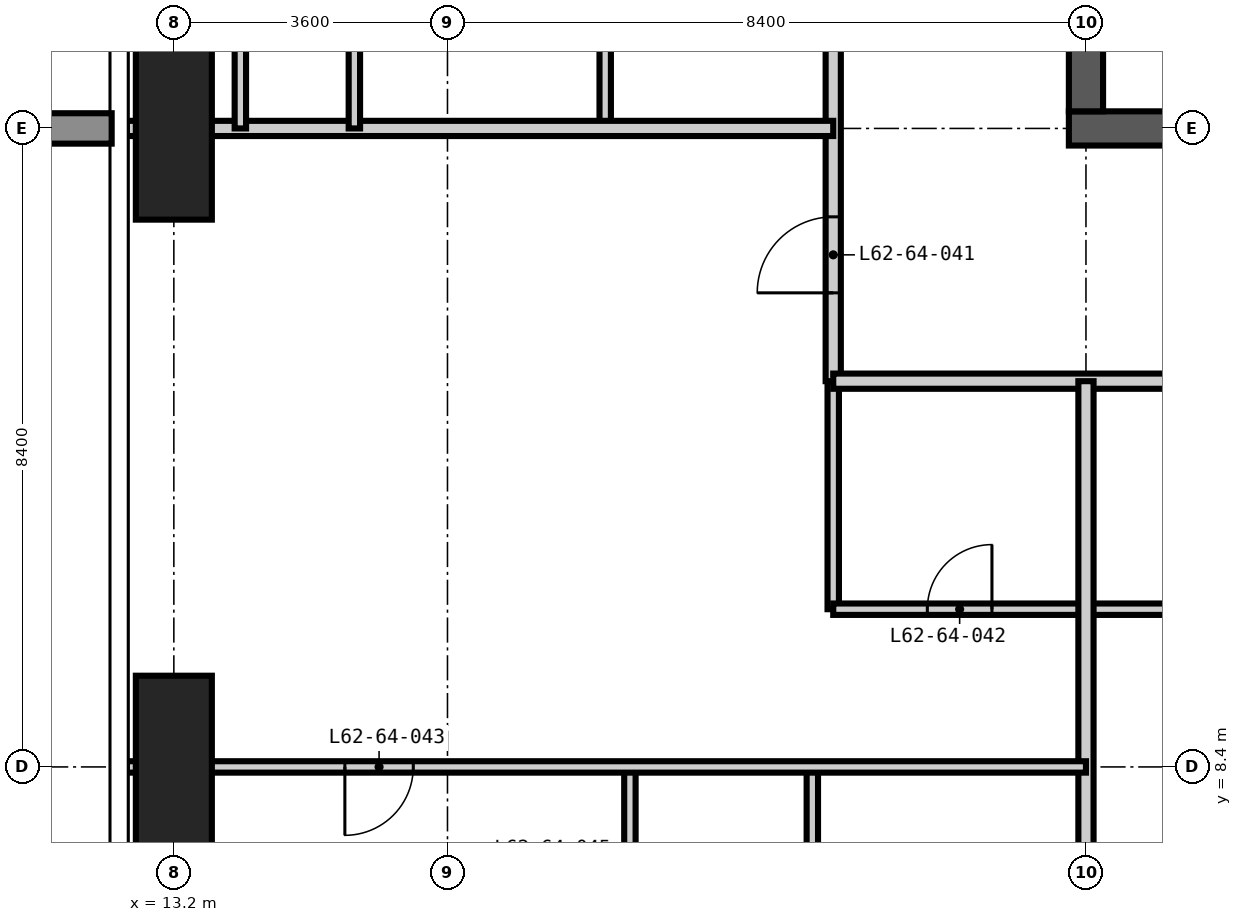
"""IFC4 building model, lengths in metres.
Left out: names, types, materials, properties, quantities, classifications, styles, units other than length and angle.
Written with IfcOpenShell. Run it as: python <this file> out.ifc"""

import sys

from ifc_helpers import new_model, si_unit, direction, frame, frame_2d, origin, origin_2d, place, context, subcontext, project, spatial, rectangle, extrude, element, fill, save


model = new_model("IFC4")
c1 = context("Model", 3, precision=1e-05, world=origin(), true_north=direction((0.0, 1.0)))
c2 = subcontext(c1, "Body", "Model", "MODEL_VIEW")
j1 = project(units=[si_unit("LENGTHUNIT", "METRE"), si_unit("PLANEANGLEUNIT", "RADIAN")], contexts=[c1])
p1 = place(None, origin())
s1 = spatial("IfcSite", under=j1, at=p1, CompositionType="ELEMENT")
p2 = place(p1, origin())
s2 = spatial("IfcBuilding", under=s1, at=p2, CompositionType="ELEMENT")
p3 = place(p2, frame((0.0, 0.0, 241.2)))
s3 = spatial("IfcBuildingStorey", under=s2, at=p3, CompositionType="ELEMENT", Elevation=241.2)
for number, where, z_axis, x_axis in (
    (1, (13.2, 8.4, -0.35), (0.0, 0.0, 1.0), (1.0, 0.0, 0.0)),
    (2, (13.2, 16.8, -0.35), (0.0, 0.0, 1.0), (1.0, 0.0, 0.0)),
):
    element("IfcColumn", number, at=place(p3, frame(where, z_axis=z_axis, x_axis=x_axis)), inside=s3, PredefinedType="COLUMN", context=c2, shape_type="SweptSolid", body=[
        extrude(rectangle(XDim=1.0, YDim=2.4, at=origin_2d()), origin(), (0.0, 0.0, 1.0), 3.9),
    ])
p4 = place(p3, frame((24.975, 16.8, -0.35), z_axis=(0.0, 0.0, 1.0), x_axis=(1.0, 0.0, 0.0)))
e3 = element("IfcWall", 3, at=p4, inside=s3, PredefinedType="SHEAR", context=c2, shape_type="SweptSolid", body=[
    extrude(rectangle(XDim=17.25, YDim=0.45, at=frame_2d((8.625, 0.0))), origin(), (0.0, 0.0, 1.0), 3.9),
])
p5 = place(p4, frame((3.925, 0.0, 0.35)))
e4 = element("IfcOpeningElement", 4, at=p5, cuts=e3, PredefinedType="OPENING", context=c2, shape_type="SweptSolid", body=[
    extrude(rectangle(XDim=1.0, YDim=2.1, at=frame_2d((0.5, 1.05))), frame((0.0, 0.235, 0.0), z_axis=(0.0, -1.0, 0.0), x_axis=(1.0, 0.0, 0.0)), (0.0, 0.0, 1.0), 0.47),
])
p6 = place(p4, frame((10.225, 0.0, 0.35)))
e5 = element("IfcOpeningElement", 5, at=p6, cuts=e3, PredefinedType="OPENING", context=c2, shape_type="SweptSolid", body=[
    extrude(rectangle(XDim=1.0, YDim=2.1, at=frame_2d((0.5, 1.05))), frame((0.0, 0.235, 0.0), z_axis=(0.0, -1.0, 0.0), x_axis=(1.0, 0.0, 0.0)), (0.0, 0.0, 1.0), 0.47),
])
p7 = place(p3, frame((25.2, 41.775, -0.35), z_axis=(0.0, 0.0, 1.0), x_axis=(0.0, -1.0, 0.0)))
e6 = element("IfcWall", 6, at=p7, inside=s3, PredefinedType="SHEAR", context=c2, shape_type="SweptSolid", body=[
    extrude(rectangle(XDim=24.75, YDim=0.45, at=frame_2d((12.375, 0.0))), origin(), (0.0, 0.0, 1.0), 3.9),
])
p8 = place(p7, frame((11.875, 0.0, 0.35)))
e7 = element("IfcOpeningElement", 7, at=p8, cuts=e6, PredefinedType="OPENING", context=c2, shape_type="SweptSolid", body=[
    extrude(rectangle(XDim=1.0, YDim=2.1, at=frame_2d((0.5, 1.05))), frame((0.0, 0.235, 0.0), z_axis=(0.0, -1.0, 0.0), x_axis=(1.0, 0.0, 0.0)), (0.0, 0.0, 1.0), 0.47),
])
for number, where, z_axis, x_axis in (
    (8, (18.875, 16.8, 0.0), (0.0, 0.0, 1.0), (0.0, 1.0, 0.0)),
    (9, (21.875, 10.475, 0.0), (0.0, 0.0, 1.0), (0.0, 1.0, 0.0)),
):
    element("IfcWall", number, at=place(p3, frame(where, z_axis=z_axis, x_axis=x_axis)), inside=s3, PredefinedType="PARTITIONING", context=c2, shape_type="SweptSolid", body=[
        extrude(rectangle(XDim=3.0, YDim=0.15, at=frame_2d((1.5, 0.0))), origin(), (0.0, 0.0, 1.0), 3.55),
    ])
p9 = place(p3, frame((21.875, 10.475, 0.0), z_axis=(0.0, 0.0, 1.0), x_axis=(1.0, 0.0, 0.0)))
e10 = element("IfcWall", 10, at=p9, inside=s3, PredefinedType="PARTITIONING", context=c2, shape_type="SweptSolid", body=[
    extrude(rectangle(XDim=6.325, YDim=0.15, at=frame_2d((3.163, 0.0))), origin(), (0.0, 0.0, 1.0), 3.55),
])
p10 = place(p9, frame((1.238, 0.0, 0.0)))
e11 = element("IfcOpeningElement", 11, at=p10, cuts=e10, PredefinedType="OPENING", context=c2, shape_type="SweptSolid", body=[
    extrude(rectangle(XDim=0.85, YDim=2.1, at=frame_2d((0.425, 1.05))), frame((0.0, 0.085, 0.0), z_axis=(0.0, -1.0, 0.0), x_axis=(1.0, 0.0, 0.0)), (0.0, 0.0, 1.0), 0.17),
])
p11 = place(p3, frame((21.875, 13.475, 0.0), z_axis=(0.0, 0.0, 1.0), x_axis=(0.0, 1.0, 0.0)))
e12 = element("IfcWall", 12, at=p11, inside=s3, PredefinedType="PARTITIONING", context=c2, shape_type="SweptSolid", body=[
    extrude(rectangle(XDim=31.25, YDim=0.2, at=frame_2d((15.625, 0.0))), origin(), (0.0, 0.0, 1.0), 3.55),
])
p12 = place(p11, frame((7.025, 0.0, 0.0)))
e13 = element("IfcOpeningElement", 13, at=p12, cuts=e12, PredefinedType="OPENING", context=c2, shape_type="SweptSolid", body=[
    extrude(rectangle(XDim=1.0, YDim=2.2, at=frame_2d((0.5, 1.1))), frame((0.0, 0.11, 0.0), z_axis=(0.0, -1.0, 0.0), x_axis=(1.0, 0.0, 0.0)), (0.0, 0.0, 1.0), 0.22),
])
p13 = place(p11, frame((15.425, 0.0, 0.0)))
e14 = element("IfcOpeningElement", 14, at=p13, cuts=e12, PredefinedType="OPENING", context=c2, shape_type="SweptSolid", body=[
    extrude(rectangle(XDim=1.0, YDim=2.2, at=frame_2d((0.5, 1.1))), frame((0.0, 0.11, 0.0), z_axis=(0.0, -1.0, 0.0), x_axis=(1.0, 0.0, 0.0)), (0.0, 0.0, 1.0), 0.22),
])
p14 = place(p11, frame((23.825, 0.0, 0.0)))
e15 = element("IfcOpeningElement", 15, at=p14, cuts=e12, PredefinedType="OPENING", context=c2, shape_type="SweptSolid", body=[
    extrude(rectangle(XDim=1.0, YDim=2.2, at=frame_2d((0.5, 1.1))), frame((0.0, 0.11, 0.0), z_axis=(0.0, -1.0, 0.0), x_axis=(1.0, 0.0, 0.0)), (0.0, 0.0, 1.0), 0.22),
])
p15 = place(p11, frame((1.162, 0.0, 0.0)))
e16 = element("IfcOpeningElement", 16, at=p15, cuts=e12, PredefinedType="OPENING", context=c2, shape_type="SweptSolid", body=[
    extrude(rectangle(XDim=1.0, YDim=2.2, at=frame_2d((0.5, 1.1))), frame((0.0, 0.11, 0.0), z_axis=(0.0, -1.0, 0.0), x_axis=(1.0, 0.0, 0.0)), (0.0, 0.0, 1.0), 0.22),
])
p16 = place(p11, frame((29.387, 0.0, 0.0)))
e17 = element("IfcOpeningElement", 17, at=p16, cuts=e12, PredefinedType="OPENING", context=c2, shape_type="SweptSolid", body=[
    extrude(rectangle(XDim=1.0, YDim=2.2, at=frame_2d((0.5, 1.1))), frame((0.0, 0.11, 0.0), z_axis=(0.0, -1.0, 0.0), x_axis=(1.0, 0.0, 0.0)), (0.0, 0.0, 1.0), 0.22),
])
p17 = place(p3, frame((44.125, 13.475, 0.0), z_axis=(0.0, 0.0, 1.0), x_axis=(-1.0, 0.0, 0.0)))
e18 = element("IfcWall", 18, at=p17, inside=s3, PredefinedType="PARTITIONING", context=c2, shape_type="SweptSolid", body=[
    extrude(rectangle(XDim=22.25, YDim=0.2, at=frame_2d((11.125, 0.0))), origin(), (0.0, 0.0, 1.0), 3.55),
])
p18 = place(p17, frame((16.325, 0.0, 0.0)))
e19 = element("IfcOpeningElement", 19, at=p18, cuts=e18, PredefinedType="OPENING", context=c2, shape_type="SweptSolid", body=[
    extrude(rectangle(XDim=1.0, YDim=2.2, at=frame_2d((0.5, 1.1))), frame((0.0, 0.11, 0.0), z_axis=(0.0, -1.0, 0.0), x_axis=(1.0, 0.0, 0.0)), (0.0, 0.0, 1.0), 0.22),
])
p19 = place(p17, frame((10.025, 0.0, 0.0)))
e20 = element("IfcOpeningElement", 20, at=p19, cuts=e18, PredefinedType="OPENING", context=c2, shape_type="SweptSolid", body=[
    extrude(rectangle(XDim=1.0, YDim=2.2, at=frame_2d((0.5, 1.1))), frame((0.0, 0.11, 0.0), z_axis=(0.0, -1.0, 0.0), x_axis=(1.0, 0.0, 0.0)), (0.0, 0.0, 1.0), 0.22),
])
p20 = place(p17, frame((3.725, 0.0, 0.0)))
e21 = element("IfcOpeningElement", 21, at=p20, cuts=e18, PredefinedType="OPENING", context=c2, shape_type="SweptSolid", body=[
    extrude(rectangle(XDim=1.0, YDim=2.2, at=frame_2d((0.5, 1.1))), frame((0.0, 0.11, 0.0), z_axis=(0.0, -1.0, 0.0), x_axis=(1.0, 0.0, 0.0)), (0.0, 0.0, 1.0), 0.22),
])
p21 = place(p3, frame((25.2, 4.182, 0.0), z_axis=(0.0, 0.0, 1.0), x_axis=(0.0, 1.0, 0.0)))
e22 = element("IfcWall", 22, at=p21, inside=s3, PredefinedType="PARTITIONING", context=c2, shape_type="SweptSolid", body=[
    extrude(rectangle(XDim=9.293, YDim=0.2, at=frame_2d((4.646, 0.0))), origin(), (0.0, 0.0, 1.0), 3.55),
])
p22 = place(p3, frame((12.582, 16.8, 0.0), z_axis=(0.0, 0.0, 1.0), x_axis=(1.0, 0.0, 0.0)))
e23 = element("IfcWall", 23, at=p22, inside=s3, PredefinedType="PARTITIONING", context=c2, shape_type="SweptSolid", body=[
    extrude(rectangle(XDim=9.293, YDim=0.2, at=frame_2d((4.646, 0.0))), origin(), (0.0, 0.0, 1.0), 3.55),
])
p23 = place(p3, frame((14.075, 16.8, 0.0), z_axis=(0.0, 0.0, 1.0), x_axis=(0.0, 1.0, 0.0)))
e24 = element("IfcWall", 24, at=p23, inside=s3, PredefinedType="PARTITIONING", context=c2, shape_type="SweptSolid", body=[
    extrude(rectangle(XDim=3.0, YDim=0.15, at=frame_2d((1.5, 0.0))), origin(), (0.0, 0.0, 1.0), 3.55),
])
p24 = place(p23, frame((1.25, 0.0, 0.0)))
e25 = element("IfcOpeningElement", 25, at=p24, cuts=e24, PredefinedType="OPENING", context=c2, shape_type="SweptSolid", body=[
    extrude(rectangle(XDim=0.9, YDim=2.1, at=frame_2d((0.45, 1.05))), frame((0.0, 0.085, 0.0), z_axis=(0.0, -1.0, 0.0), x_axis=(1.0, 0.0, 0.0)), (0.0, 0.0, 1.0), 0.17),
])
p25 = place(p3, frame((15.575, 16.8, 0.0), z_axis=(0.0, 0.0, 1.0), x_axis=(0.0, 1.0, 0.0)))
e26 = element("IfcWall", 26, at=p25, inside=s3, PredefinedType="PARTITIONING", context=c2, shape_type="SweptSolid", body=[
    extrude(rectangle(XDim=3.0, YDim=0.15, at=frame_2d((1.5, 0.0))), origin(), (0.0, 0.0, 1.0), 3.55),
])
p26 = place(p3, frame((19.2, 5.4, 0.0), z_axis=(0.0, 0.0, 1.0), x_axis=(0.0, 1.0, 0.0)))
e27 = element("IfcWall", 27, at=p26, inside=s3, PredefinedType="PARTITIONING", context=c2, shape_type="SweptSolid", body=[
    extrude(rectangle(XDim=3.0, YDim=0.15, at=frame_2d((1.5, 0.0))), origin(), (0.0, 0.0, 1.0), 3.55),
])
p27 = place(p26, frame((1.05, 0.0, 0.0)))
e28 = element("IfcOpeningElement", 28, at=p27, cuts=e27, PredefinedType="OPENING", context=c2, shape_type="SweptSolid", body=[
    extrude(rectangle(XDim=0.9, YDim=2.1, at=frame_2d((0.45, 1.05))), frame((0.0, 0.085, 0.0), z_axis=(0.0, -1.0, 0.0), x_axis=(1.0, 0.0, 0.0)), (0.0, 0.0, 1.0), 0.17),
])
p28 = place(p3, frame((21.6, 5.4, 0.0), z_axis=(0.0, 0.0, 1.0), x_axis=(0.0, 1.0, 0.0)))
e29 = element("IfcWall", 29, at=p28, inside=s3, PredefinedType="PARTITIONING", context=c2, shape_type="SweptSolid", body=[
    extrude(rectangle(XDim=3.0, YDim=0.15, at=frame_2d((1.5, 0.0))), origin(), (0.0, 0.0, 1.0), 3.55),
])
p29 = place(p3, frame((12.582, 8.4, 0.0), z_axis=(0.0, 0.0, 1.0), x_axis=(1.0, 0.0, 0.0)))
e30 = element("IfcWall", 30, at=p29, inside=s3, PredefinedType="PARTITIONING", context=c2, shape_type="SweptSolid", body=[
    extrude(rectangle(XDim=12.618, YDim=0.15, at=frame_2d((6.309, 0.0))), origin(), (0.0, 0.0, 1.0), 3.55),
])
p30 = place(p29, frame((2.868, 0.0, 0.0)))
e31 = element("IfcOpeningElement", 31, at=p30, cuts=e30, PredefinedType="OPENING", context=c2, shape_type="SweptSolid", body=[
    extrude(rectangle(XDim=0.9, YDim=2.1, at=frame_2d((0.45, 1.05))), frame((0.0, 0.085, 0.0), z_axis=(0.0, -1.0, 0.0), x_axis=(1.0, 0.0, 0.0)), (0.0, 0.0, 1.0), 0.17),
])
p31 = place(p15, origin())
e32 = element("IfcDoor", 32, at=p31, inside=s3, OperationType="SINGLE_SWING_LEFT", PredefinedType="DOOR", context=c2, shape_type="SweptSolid", body=[
    extrude(rectangle(XDim=1.0, YDim=2.2, at=frame_2d((0.5, 1.1))), frame((0.0, 0.025, 0.0), z_axis=(0.0, -1.0, 0.0), x_axis=(1.0, 0.0, 0.0)), (0.0, 0.0, 1.0), 0.05),
])
fill(e16, e32)
p32 = place(p10, origin())
e33 = element("IfcDoor", 33, at=p32, inside=s3, OperationType="SINGLE_SWING_RIGHT", PredefinedType="DOOR", context=c2, shape_type="SweptSolid", body=[
    extrude(rectangle(XDim=0.85, YDim=2.1, at=frame_2d((0.425, 1.05))), frame((0.0, 0.025, 0.0), z_axis=(0.0, -1.0, 0.0), x_axis=(1.0, 0.0, 0.0)), (0.0, 0.0, 1.0), 0.05),
])
fill(e11, e33)
p33 = place(p30, frame((0.9, 0.0, 0.0), z_axis=(0.0, 0.0, 1.0), x_axis=(-1.0, 0.0, 0.0)))
e34 = element("IfcDoor", 34, at=p33, inside=s3, OperationType="SINGLE_SWING_RIGHT", PredefinedType="DOOR", context=c2, shape_type="SweptSolid", body=[
    extrude(rectangle(XDim=0.9, YDim=2.1, at=frame_2d((0.45, 1.05))), frame((0.0, 0.025, 0.0), z_axis=(0.0, -1.0, 0.0), x_axis=(1.0, 0.0, 0.0)), (0.0, 0.0, 1.0), 0.05),
])
fill(e31, e34)
save(model, sys.argv[1])
